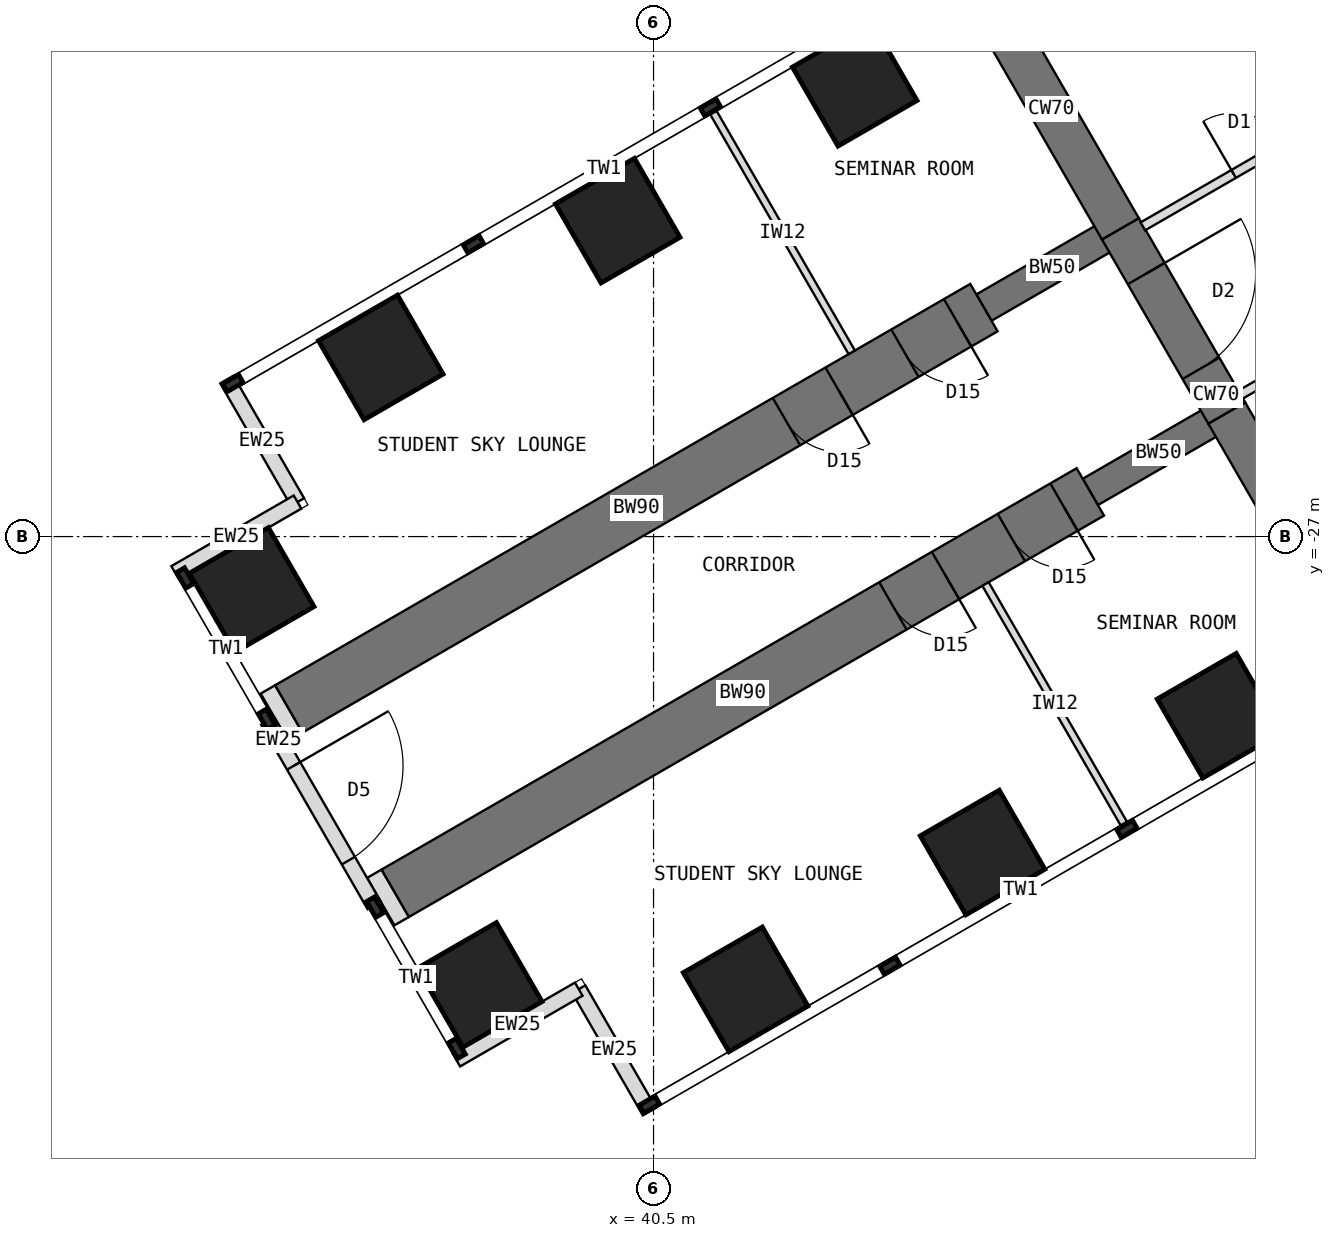
"""IFC4 building model, lengths in metres.
Left out: names, types, materials, properties, quantities, classifications, styles, units other than length and angle.
Written with IfcOpenShell. Run it as: python <this file> out.ifc"""

import sys

from ifc_helpers import new_model, si_unit, direction, frame, frame_2d, origin, origin_2d, place, context, subcontext, project, spatial, rectangle, extrude, element, fill, save


model = new_model("IFC4")
c1 = context("Model", 3, precision=1e-05, world=origin(), true_north=direction((0.0, 1.0)))
c2 = subcontext(c1, "Body", "Model", "MODEL_VIEW")
j1 = project(units=[si_unit("LENGTHUNIT", "METRE"), si_unit("PLANEANGLEUNIT", "RADIAN")], contexts=[c1])
p1 = place(None, origin())
s1 = spatial("IfcSite", under=j1, at=p1, CompositionType="ELEMENT")
p2 = place(p1, origin())
s2 = spatial("IfcBuilding", under=s1, at=p2, CompositionType="ELEMENT")
p3 = place(p2, frame((0.0, 0.0, 20.5)))
s3 = spatial("IfcBuildingStorey", under=s2, at=p3, CompositionType="ELEMENT", Elevation=20.5)
p4 = place(p3, frame((45.904, -18.0, 0.0), z_axis=(0.0, 0.0, 1.0), x_axis=(0.500024481964, -0.866011268655, 0.0)))
e1 = element("IfcWall", 1, at=p4, inside=s3, PredefinedType="SHEAR", context=c2, shape_type="SweptSolid", body=[
    extrude(rectangle(XDim=4.548, YDim=0.7, at=frame_2d((2.274, 0.0))), origin(), (0.0, 0.0, 1.0), 4.0),
])
p5 = place(p3, frame((48.178, -21.939, 0.0), z_axis=(0.0, 0.0, 1.0), x_axis=(0.500010275428, -0.866019471182, 0.0)))
e2 = element("IfcWall", 2, at=p5, inside=s3, PredefinedType="SHEAR", context=c2, shape_type="SweptSolid", body=[
    extrude(rectangle(XDim=3.5, YDim=0.7, at=frame_2d((1.75, 0.0))), origin(), (0.0, 0.0, 1.0), 4.0),
])
p6 = place(p5, frame((0.85, 0.0, 0.0)))
e3 = element("IfcOpeningElement", 3, at=p6, cuts=e2, PredefinedType="OPENING", context=c2, shape_type="SweptSolid", body=[
    extrude(rectangle(XDim=1.8, YDim=2.1, at=frame_2d((0.9, 1.05))), frame((0.0, 0.36, 0.0), z_axis=(0.0, -1.0, 0.0), x_axis=(1.0, 0.0, 0.0)), (0.0, 0.0, 1.0), 0.72),
])
p7 = place(p3, frame((49.928, -24.97, 0.0), z_axis=(0.0, 0.0, 1.0), x_axis=(0.499984222037, -0.866034513004, 0.0)))
e4 = element("IfcWall", 4, at=p7, inside=s3, PredefinedType="SHEAR", context=c2, shape_type="SweptSolid", body=[
    extrude(rectangle(XDim=4.548, YDim=0.7, at=frame_2d((2.274, 0.0))), origin(), (0.0, 0.0, 1.0), 4.0),
])
p8 = place(p3, frame((49.928, -24.97, 0.0), z_axis=(0.0, 0.0, 1.0), x_axis=(-0.866031863473, -0.499988811324, 0.0)))
e5 = element("IfcWall", 5, at=p8, inside=s3, PredefinedType="SHEAR", context=c2, shape_type="SweptSolid", body=[
    extrude(rectangle(XDim=2.592, YDim=0.5, at=frame_2d((1.296, 0.0))), origin(), (0.0, 0.0, 1.0), 4.0),
])
p9 = place(p3, frame((47.684, -26.266, 0.0), z_axis=(0.0, 0.0, 1.0), x_axis=(-0.866027579429, -0.499996231654, 0.0)))
e6 = element("IfcWall", 6, at=p9, inside=s3, PredefinedType="SHEAR", context=c2, shape_type="SweptSolid", body=[
    extrude(rectangle(XDim=13.2, YDim=0.9, at=frame_2d((6.6, 0.0))), origin(), (0.0, 0.0, 1.0), 4.0),
])
p10 = place(p9, frame((0.5, 0.0, 0.0)))
e7 = element("IfcOpeningElement", 7, at=p10, cuts=e6, PredefinedType="OPENING", context=c2, shape_type="SweptSolid", body=[
    extrude(rectangle(XDim=1.0, YDim=2.1, at=frame_2d((0.5, 1.05))), frame((0.0, 0.46, 0.0), z_axis=(0.0, -1.0, 0.0), x_axis=(1.0, 0.0, 0.0)), (0.0, 0.0, 1.0), 0.92),
])
p11 = place(p9, frame((2.75, 0.0, 0.0)))
e8 = element("IfcOpeningElement", 8, at=p11, cuts=e6, PredefinedType="OPENING", context=c2, shape_type="SweptSolid", body=[
    extrude(rectangle(XDim=1.0, YDim=2.1, at=frame_2d((0.5, 1.05))), frame((0.0, 0.46, 0.0), z_axis=(0.0, -1.0, 0.0), x_axis=(1.0, 0.0, 0.0)), (0.0, 0.0, 1.0), 0.92),
])
p12 = place(p3, frame((48.178, -21.939, 0.0), z_axis=(0.0, 0.0, 1.0), x_axis=(-0.866072649678, -0.499918158782, 0.0)))
e9 = element("IfcWall", 9, at=p12, inside=s3, PredefinedType="SHEAR", context=c2, shape_type="SweptSolid", body=[
    extrude(rectangle(XDim=2.592, YDim=0.5, at=frame_2d((1.296, 0.0))), origin(), (0.0, 0.0, 1.0), 4.0),
])
p13 = place(p3, frame((45.934, -23.234, 0.0), z_axis=(0.0, 0.0, 1.0), x_axis=(-0.866019570528, -0.500010103361, 0.0)))
e10 = element("IfcWall", 10, at=p13, inside=s3, PredefinedType="SHEAR", context=c2, shape_type="SweptSolid", body=[
    extrude(rectangle(XDim=13.2, YDim=0.9, at=frame_2d((6.6, 0.0))), origin(), (0.0, 0.0, 1.0), 4.0),
])
p14 = place(p13, frame((0.5, 0.0, 0.0)))
e11 = element("IfcOpeningElement", 11, at=p14, cuts=e10, PredefinedType="OPENING", context=c2, shape_type="SweptSolid", body=[
    extrude(rectangle(XDim=1.0, YDim=2.1, at=frame_2d((0.5, 1.05))), frame((0.0, 0.46, 0.0), z_axis=(0.0, -1.0, 0.0), x_axis=(1.0, 0.0, 0.0)), (0.0, 0.0, 1.0), 0.92),
])
p15 = place(p13, frame((2.75, 0.0, 0.0)))
e12 = element("IfcOpeningElement", 12, at=p15, cuts=e10, PredefinedType="OPENING", context=c2, shape_type="SweptSolid", body=[
    extrude(rectangle(XDim=1.0, YDim=2.1, at=frame_2d((0.5, 1.05))), frame((0.0, 0.46, 0.0), z_axis=(0.0, -1.0, 0.0), x_axis=(1.0, 0.0, 0.0)), (0.0, 0.0, 1.0), 0.92),
])
for number, where, z_axis, x_axis in (
    (13, (49.809, -29.946, 0.0), (0.0, 0.0, 1.0), (0.866, 0.5, 0.0)),
    (14, (43.809, -19.554, 0.0), (0.0, 0.0, 1.0), (0.866, 0.5, 0.0)),
    (15, (45.912, -32.196, 0.0), (0.0, 0.0, 1.0), (0.866, 0.5, 0.0)),
    (16, (39.912, -21.804, 0.0), (0.0, 0.0, 1.0), (0.866, 0.5, 0.0)),
    (17, (42.014, -34.446, 0.0), (0.0, 0.0, 1.0), (0.866, 0.5, 0.0)),
    (18, (36.014, -24.054, 0.0), (0.0, 0.0, 1.0), (0.866, 0.5, 0.0)),
    (19, (37.642, -34.373, 0.0), (0.0, 0.0, 1.0), (0.866, 0.5, 0.0)),
    (20, (33.892, -27.877, 0.0), (0.0, 0.0, 1.0), (0.866, 0.5, 0.0)),
):
    element("IfcColumn", number, at=place(p3, frame(where, z_axis=z_axis, x_axis=x_axis)), inside=s3, PredefinedType="COLUMN", context=c2, shape_type="SweptSolid", body=[
        extrude(rectangle(XDim=1.5, YDim=1.5, at=origin_2d()), origin(), (0.0, 0.0, 1.0), 4.0),
    ])
for number, where, z_axis, x_axis in (
    (21, (40.433, -36.456, 0.0), (0.0, 0.0, 1.0), (-0.5, 0.866, 0.0)),
    (22, (39.27, -34.443, 0.0), (0.0, 0.0, 1.0), (-0.866, -0.5, 0.0)),
    (23, (33.483, -24.419, 0.0), (0.0, 0.0, 1.0), (0.5, -0.866, 0.0)),
    (24, (34.645, -26.432, 0.0), (0.0, 0.0, 1.0), (-0.866, -0.5, 0.0)),
):
    element("IfcWall", number, at=place(p3, frame(where, z_axis=z_axis, x_axis=x_axis)), inside=s3, PredefinedType="STANDARD", context=c2, shape_type="SweptSolid", body=[
        extrude(rectangle(XDim=2.325, YDim=0.25, at=frame_2d((1.163, 0.0))), origin(), (0.0, 0.0, 1.0), 3.8),
    ])
p16 = place(p3, frame((34.156, -30.034, 0.0), z_axis=(0.0, 0.0, 1.0), x_axis=(0.500010275428, -0.866019471182, 0.0)))
e25 = element("IfcWall", 25, at=p16, inside=s3, PredefinedType="STANDARD", context=c2, shape_type="SweptSolid", body=[
    extrude(rectangle(XDim=3.5, YDim=0.25, at=frame_2d((1.75, 0.0))), origin(), (0.0, 0.0, 1.0), 3.8),
])
p17 = place(p16, frame((0.85, 0.0, 0.0)))
e26 = element("IfcOpeningElement", 26, at=p17, cuts=e25, PredefinedType="OPENING", context=c2, shape_type="SweptSolid", body=[
    extrude(rectangle(XDim=1.8, YDim=2.4, at=frame_2d((0.9, 1.2))), frame((0.0, 0.135, 0.0), z_axis=(0.0, -1.0, 0.0), x_axis=(1.0, 0.0, 0.0)), (0.0, 0.0, 1.0), 0.27),
])
for number, where, z_axis, x_axis in (
    (27, (36.252, -32.865, 0.0), (0.0, 0.0, 1.0), (-0.866, -0.5, 0.0)),
    (28, (34.502, -29.834, 0.0), (0.0, 0.0, 1.0), (-0.866, -0.5, 0.0)),
):
    element("IfcWall", number, at=place(p3, frame(where, z_axis=z_axis, x_axis=x_axis)), inside=s3, PredefinedType="PARTITIONING", context=c2, shape_type="SweptSolid", body=[
        extrude(rectangle(XDim=0.275, YDim=0.9, at=frame_2d((0.138, 0.0))), origin(), (0.0, 0.0, 1.0), 3.8),
    ])
p18 = place(p3, frame((52.38, -19.201, 0.0), z_axis=(0.0, 0.0, 1.0), x_axis=(-0.866023886965, 0.500002627198, 0.0)))
e29 = element("IfcWall", 29, at=p18, inside=s3, PredefinedType="SHEAR", context=c2, shape_type="SweptSolid", body=[
    extrude(rectangle(XDim=5.858, YDim=0.4, at=frame_2d((2.929, 0.0))), origin(), (0.0, 0.0, 1.0), 4.0),
])
for number, where, z_axis, x_axis in (
    (30, (45.96, -27.78, 0.0), (0.0, 0.0, 1.0), (0.5, -0.866, 0.0)),
    (31, (43.76, -23.97, 0.0), (0.0, 0.0, 1.0), (-0.5, 0.866, 0.0)),
):
    element("IfcWall", number, at=place(p3, frame(where, z_axis=z_axis, x_axis=x_axis)), inside=s3, PredefinedType="PARTITIONING", context=c2, shape_type="SweptSolid", body=[
        extrude(rectangle(XDim=4.55, YDim=0.12, at=frame_2d((2.275, 0.0))), origin(), (0.0, 0.0, 1.0), 3.8),
    ])
p19 = place(p3, frame((54.017, -22.436, 0.0), z_axis=(0.0, 0.0, 1.0), x_axis=(-0.866015446554, -0.500017246033, 0.0)))
e32 = element("IfcWall", 32, at=p19, inside=s3, PredefinedType="PARTITIONING", context=c2, shape_type="SweptSolid", body=[
    extrude(rectangle(XDim=4.469, YDim=0.15, at=frame_2d((2.234, 0.0))), origin(), (0.0, 0.0, 1.0), 3.8),
])
p20 = place(p19, frame((1.744, 0.0, 0.0)))
e33 = element("IfcOpeningElement", 33, at=p20, cuts=e32, PredefinedType="OPENING", context=c2, shape_type="SweptSolid", body=[
    extrude(rectangle(XDim=1.0, YDim=2.1, at=frame_2d((0.5, 1.05))), frame((0.0, 0.085, 0.0), z_axis=(0.0, -1.0, 0.0), x_axis=(1.0, 0.0, 0.0)), (0.0, 0.0, 1.0), 0.17),
])
p21 = place(p3, frame((48.548, -21.898, 0.0), z_axis=(0.0, 0.0, 1.0), x_axis=(0.866025445582, 0.499999927604, 0.0)))
e34 = element("IfcWall", 34, at=p21, inside=s3, PredefinedType="PARTITIONING", context=c2, shape_type="SweptSolid", body=[
    extrude(rectangle(XDim=4.468, YDim=0.15, at=frame_2d((2.234, 0.0))), origin(), (0.0, 0.0, 1.0), 3.8),
])
p22 = place(p21, frame((1.724, 0.0, 0.0)))
e35 = element("IfcOpeningElement", 35, at=p22, cuts=e34, PredefinedType="OPENING", context=c2, shape_type="SweptSolid", body=[
    extrude(rectangle(XDim=1.0, YDim=2.1, at=frame_2d((0.5, 1.05))), frame((0.0, 0.085, 0.0), z_axis=(0.0, -1.0, 0.0), x_axis=(1.0, 0.0, 0.0)), (0.0, 0.0, 1.0), 0.17),
])
p23 = place(p17, origin())
e36 = element("IfcDoor", 36, at=p23, inside=s3, OperationType="DOUBLE_DOOR_DOUBLE_SWING", PredefinedType="DOOR", context=c2, shape_type="SweptSolid", body=[
    extrude(rectangle(XDim=1.8, YDim=2.4, at=frame_2d((0.9, 1.2))), frame((0.0, 0.025, 0.0), z_axis=(0.0, -1.0, 0.0), x_axis=(1.0, 0.0, 0.0)), (0.0, 0.0, 1.0), 0.05),
])
fill(e26, e36)
p24 = place(p6, origin())
e37 = element("IfcDoor", 37, at=p24, inside=s3, OperationType="DOUBLE_DOOR_DOUBLE_SWING", PredefinedType="DOOR", context=c2, shape_type="SweptSolid", body=[
    extrude(rectangle(XDim=1.72, YDim=2.06, at=frame_2d((0.9, 1.03))), frame((0.0, 0.025, 0.0), z_axis=(0.0, -1.0, 0.0), x_axis=(1.0, 0.0, 0.0)), (0.0, 0.0, 1.0), 0.05),
    extrude(rectangle(XDim=0.04, YDim=2.1, at=frame_2d((0.02, 1.05))), frame((0.0, 0.35, 0.0), z_axis=(0.0, -1.0, 0.0), x_axis=(1.0, 0.0, 0.0)), (0.0, 0.0, 1.0), 0.699),
    extrude(rectangle(XDim=0.04, YDim=2.1, at=frame_2d((1.78, 1.05))), frame((0.0, 0.35, 0.0), z_axis=(0.0, -1.0, 0.0), x_axis=(1.0, 0.0, 0.0)), (0.0, 0.0, 1.0), 0.699),
    extrude(rectangle(XDim=1.72, YDim=0.04, at=frame_2d((0.9, 2.08))), frame((0.0, 0.35, 0.0), z_axis=(0.0, -1.0, 0.0), x_axis=(1.0, 0.0, 0.0)), (0.0, 0.0, 1.0), 0.699),
])
fill(e3, e37)
p25 = place(p22, origin())
e38 = element("IfcDoor", 38, at=p25, inside=s3, OperationType="SINGLE_SWING_LEFT", PredefinedType="DOOR", context=c2, shape_type="SweptSolid", body=[
    extrude(rectangle(XDim=1.0, YDim=2.1, at=frame_2d((0.5, 1.05))), frame((0.0, 0.025, 0.0), z_axis=(0.0, -1.0, 0.0), x_axis=(1.0, 0.0, 0.0)), (0.0, 0.0, 1.0), 0.05),
])
fill(e35, e38)
p26 = place(p10, origin())
e39 = element("IfcDoor", 39, at=p26, inside=s3, OperationType="SINGLE_SWING_LEFT", PredefinedType="DOOR", context=c2, shape_type="SweptSolid", body=[
    extrude(rectangle(XDim=0.92, YDim=2.06, at=frame_2d((0.5, 1.03))), frame((0.0, 0.025, 0.0), z_axis=(0.0, -1.0, 0.0), x_axis=(1.0, 0.0, 0.0)), (0.0, 0.0, 1.0), 0.05),
    extrude(rectangle(XDim=0.04, YDim=2.1, at=frame_2d((0.02, 1.05))), frame((0.0, 0.45, 0.0), z_axis=(0.0, -1.0, 0.0), x_axis=(1.0, 0.0, 0.0)), (0.0, 0.0, 1.0), 0.899),
    extrude(rectangle(XDim=0.04, YDim=2.1, at=frame_2d((0.98, 1.05))), frame((0.0, 0.45, 0.0), z_axis=(0.0, -1.0, 0.0), x_axis=(1.0, 0.0, 0.0)), (0.0, 0.0, 1.0), 0.899),
    extrude(rectangle(XDim=0.92, YDim=0.04, at=frame_2d((0.5, 2.08))), frame((0.0, 0.45, 0.0), z_axis=(0.0, -1.0, 0.0), x_axis=(1.0, 0.0, 0.0)), (0.0, 0.0, 1.0), 0.899),
])
fill(e7, e39)
p27 = place(p11, origin())
e40 = element("IfcDoor", 40, at=p27, inside=s3, OperationType="SINGLE_SWING_LEFT", PredefinedType="DOOR", context=c2, shape_type="SweptSolid", body=[
    extrude(rectangle(XDim=0.92, YDim=2.06, at=frame_2d((0.5, 1.03))), frame((0.0, 0.025, 0.0), z_axis=(0.0, -1.0, 0.0), x_axis=(1.0, 0.0, 0.0)), (0.0, 0.0, 1.0), 0.05),
    extrude(rectangle(XDim=0.04, YDim=2.1, at=frame_2d((0.02, 1.05))), frame((0.0, 0.45, 0.0), z_axis=(0.0, -1.0, 0.0), x_axis=(1.0, 0.0, 0.0)), (0.0, 0.0, 1.0), 0.899),
    extrude(rectangle(XDim=0.04, YDim=2.1, at=frame_2d((0.98, 1.05))), frame((0.0, 0.45, 0.0), z_axis=(0.0, -1.0, 0.0), x_axis=(1.0, 0.0, 0.0)), (0.0, 0.0, 1.0), 0.899),
    extrude(rectangle(XDim=0.92, YDim=0.04, at=frame_2d((0.5, 2.08))), frame((0.0, 0.45, 0.0), z_axis=(0.0, -1.0, 0.0), x_axis=(1.0, 0.0, 0.0)), (0.0, 0.0, 1.0), 0.899),
])
fill(e8, e40)
p28 = place(p14, origin())
e41 = element("IfcDoor", 41, at=p28, inside=s3, OperationType="SINGLE_SWING_LEFT", PredefinedType="DOOR", context=c2, shape_type="SweptSolid", body=[
    extrude(rectangle(XDim=0.92, YDim=2.06, at=frame_2d((0.5, 1.03))), frame((0.0, 0.025, 0.0), z_axis=(0.0, -1.0, 0.0), x_axis=(1.0, 0.0, 0.0)), (0.0, 0.0, 1.0), 0.05),
    extrude(rectangle(XDim=0.04, YDim=2.1, at=frame_2d((0.02, 1.05))), frame((0.0, 0.45, 0.0), z_axis=(0.0, -1.0, 0.0), x_axis=(1.0, 0.0, 0.0)), (0.0, 0.0, 1.0), 0.899),
    extrude(rectangle(XDim=0.04, YDim=2.1, at=frame_2d((0.98, 1.05))), frame((0.0, 0.45, 0.0), z_axis=(0.0, -1.0, 0.0), x_axis=(1.0, 0.0, 0.0)), (0.0, 0.0, 1.0), 0.899),
    extrude(rectangle(XDim=0.92, YDim=0.04, at=frame_2d((0.5, 2.08))), frame((0.0, 0.45, 0.0), z_axis=(0.0, -1.0, 0.0), x_axis=(1.0, 0.0, 0.0)), (0.0, 0.0, 1.0), 0.899),
])
fill(e11, e41)
p29 = place(p15, origin())
e42 = element("IfcDoor", 42, at=p29, inside=s3, OperationType="SINGLE_SWING_LEFT", PredefinedType="DOOR", context=c2, shape_type="SweptSolid", body=[
    extrude(rectangle(XDim=0.92, YDim=2.06, at=frame_2d((0.5, 1.03))), frame((0.0, 0.025, 0.0), z_axis=(0.0, -1.0, 0.0), x_axis=(1.0, 0.0, 0.0)), (0.0, 0.0, 1.0), 0.05),
    extrude(rectangle(XDim=0.04, YDim=2.1, at=frame_2d((0.02, 1.05))), frame((0.0, 0.45, 0.0), z_axis=(0.0, -1.0, 0.0), x_axis=(1.0, 0.0, 0.0)), (0.0, 0.0, 1.0), 0.899),
    extrude(rectangle(XDim=0.04, YDim=2.1, at=frame_2d((0.98, 1.05))), frame((0.0, 0.45, 0.0), z_axis=(0.0, -1.0, 0.0), x_axis=(1.0, 0.0, 0.0)), (0.0, 0.0, 1.0), 0.899),
    extrude(rectangle(XDim=0.92, YDim=0.04, at=frame_2d((0.5, 2.08))), frame((0.0, 0.45, 0.0), z_axis=(0.0, -1.0, 0.0), x_axis=(1.0, 0.0, 0.0)), (0.0, 0.0, 1.0), 0.899),
])
fill(e12, e42)
save(model, sys.argv[1])
